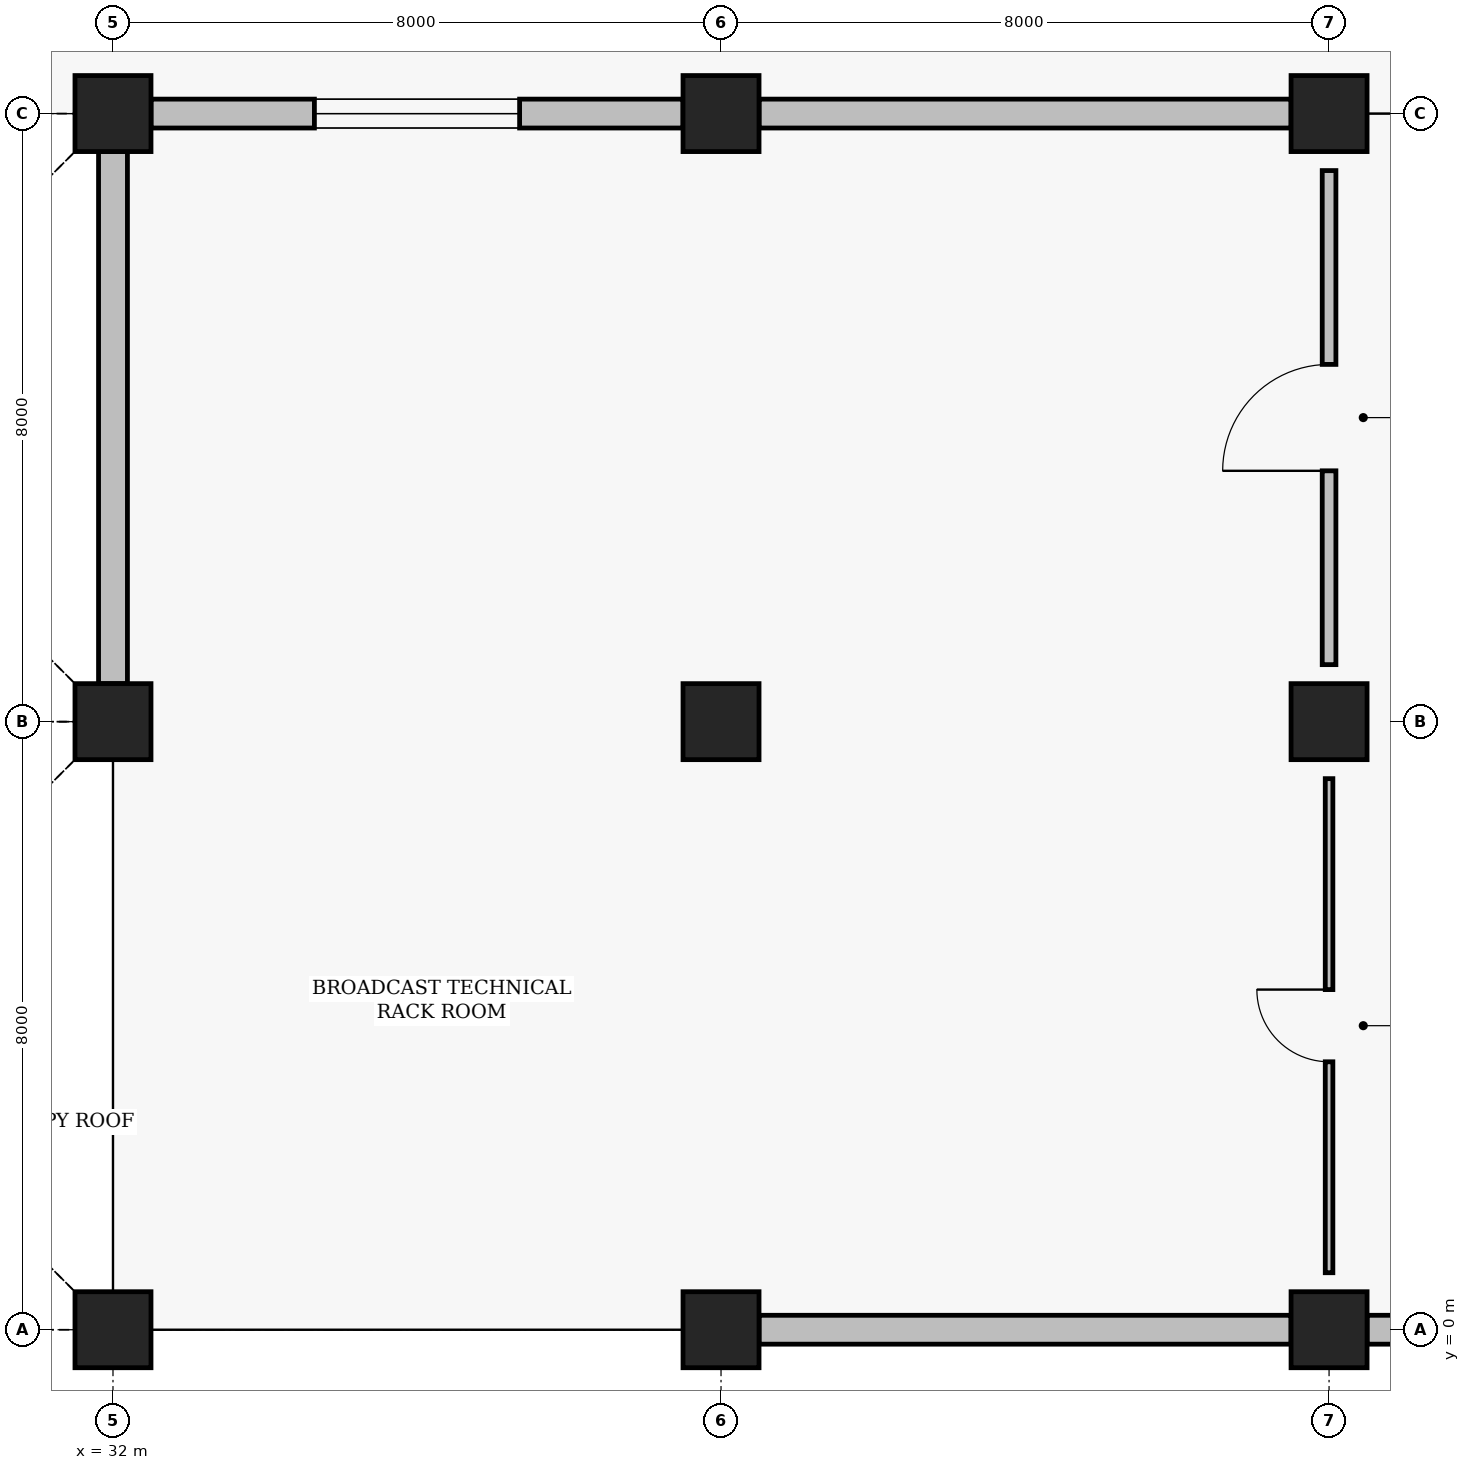
"""IFC4 building model, lengths in metres.
Left out: names, types, materials, properties, quantities, classifications, styles, units other than length and angle.
Written with IfcOpenShell. Run it as: python <this file> out.ifc"""

import sys

from ifc_helpers import new_model, si_unit, direction, frame, frame_2d, origin, origin_2d, place, context, subcontext, project, spatial, rectangle, extrude, element, fill, save


model = new_model("IFC4")
c1 = context("Model", 3, precision=1e-05, world=origin(), true_north=direction((0.0, 1.0)))
c2 = subcontext(c1, "Body", "Model", "MODEL_VIEW")
j1 = project(units=[si_unit("LENGTHUNIT", "METRE"), si_unit("PLANEANGLEUNIT", "RADIAN")], contexts=[c1])
p1 = place(None, origin())
s1 = spatial("IfcSite", under=j1, at=p1, CompositionType="ELEMENT")
p2 = place(p1, origin())
s2 = spatial("IfcBuilding", under=s1, at=p2, CompositionType="ELEMENT")
p3 = place(p2, frame((0.0, 0.0, 4.8)))
s3 = spatial("IfcBuildingStorey", under=s2, at=p3, CompositionType="ELEMENT", Elevation=4.8)
for number, where, z_axis, x_axis in (
    (1, (32.0, 0.0, 0.0), (0.0, 0.0, 1.0), (1.0, 0.0, 0.0)),
    (2, (32.0, 8.0, 0.0), (0.0, 0.0, 1.0), (1.0, 0.0, 0.0)),
    (3, (32.0, 16.0, 0.0), (0.0, 0.0, 1.0), (1.0, 0.0, 0.0)),
    (4, (40.0, 0.0, 0.0), (0.0, 0.0, 1.0), (1.0, 0.0, 0.0)),
    (5, (40.0, 8.0, 0.0), (0.0, 0.0, 1.0), (1.0, 0.0, 0.0)),
    (6, (40.0, 16.0, 0.0), (0.0, 0.0, 1.0), (1.0, 0.0, 0.0)),
    (7, (48.0, 0.0, 0.0), (0.0, 0.0, 1.0), (1.0, 0.0, 0.0)),
    (8, (48.0, 8.0, 0.0), (0.0, 0.0, 1.0), (1.0, 0.0, 0.0)),
    (9, (48.0, 16.0, 0.0), (0.0, 0.0, 1.0), (1.0, 0.0, 0.0)),
):
    element("IfcColumn", number, at=place(p3, frame(where, z_axis=z_axis, x_axis=x_axis)), inside=s3, PredefinedType="COLUMN", context=c2, shape_type="SweptSolid", body=[
        extrude(rectangle(XDim=1.0, YDim=1.0, at=origin_2d()), origin(), (0.0, 0.0, 1.0), 4.8),
    ])
p4 = place(p3, frame((32.5, 16.0, 0.0), z_axis=(0.0, 0.0, 1.0), x_axis=(1.0, 0.0, 0.0)))
e10 = element("IfcWall", 10, at=p4, inside=s3, PredefinedType="SOLIDWALL", context=c2, shape_type="SweptSolid", body=[
    extrude(rectangle(XDim=7.0, YDim=0.38, at=frame_2d((3.5, 0.0))), origin(), (0.0, 0.0, 1.0), 3.95),
])
p5 = place(p4, frame((2.15, 0.0, 0.95)))
e11 = element("IfcOpeningElement", 11, at=p5, cuts=e10, PredefinedType="OPENING", context=c2, shape_type="SweptSolid", body=[
    extrude(rectangle(XDim=2.7, YDim=2.1, at=frame_2d((1.35, 1.05))), frame((0.0, 0.2, 0.0), z_axis=(0.0, -1.0, 0.0), x_axis=(1.0, 0.0, 0.0)), (0.0, 0.0, 1.0), 0.4),
])
for number, where, z_axis, x_axis in (
    (12, (32.0, 8.5, 0.0), (0.0, 0.0, 1.0), (0.0, 1.0, 0.0)),
    (13, (40.5, 0.0, 0.0), (0.0, 0.0, 1.0), (1.0, 0.0, 0.0)),
    (14, (40.5, 16.0, 0.0), (0.0, 0.0, 1.0), (1.0, 0.0, 0.0)),
):
    element("IfcWall", number, at=place(p3, frame(where, z_axis=z_axis, x_axis=x_axis)), inside=s3, PredefinedType="SOLIDWALL", context=c2, shape_type="SweptSolid", body=[
        extrude(rectangle(XDim=7.0, YDim=0.38, at=frame_2d((3.5, 0.0))), origin(), (0.0, 0.0, 1.0), 3.95),
    ])
p6 = place(p3, frame((48.5, 0.0, 0.0), z_axis=(0.0, 0.0, 1.0), x_axis=(1.0, 0.0, 0.0)))
e15 = element("IfcWall", 15, at=p6, inside=s3, PredefinedType="SOLIDWALL", context=c2, shape_type="SweptSolid", body=[
    extrude(rectangle(XDim=7.0, YDim=0.38, at=frame_2d((3.5, 0.0))), origin(), (0.0, 0.0, 1.0), 3.95),
])
p7 = place(p6, frame((2.0, 0.0, 0.95)))
e16 = element("IfcOpeningElement", 16, at=p7, cuts=e15, PredefinedType="OPENING", context=c2, shape_type="SweptSolid", body=[
    extrude(rectangle(XDim=3.0, YDim=2.1, at=frame_2d((1.5, 1.05))), frame((0.0, 0.2, 0.0), z_axis=(0.0, -1.0, 0.0), x_axis=(1.0, 0.0, 0.0)), (0.0, 0.0, 1.0), 0.4),
])
p8 = place(p3, frame((48.0, 0.75, 0.0), z_axis=(0.0, 0.0, 1.0), x_axis=(0.0, 1.0, 0.0)))
e17 = element("IfcWall", 17, at=p8, inside=s3, PredefinedType="PARTITIONING", context=c2, shape_type="SweptSolid", body=[
    extrude(rectangle(XDim=6.5, YDim=0.1, at=frame_2d((3.25, 0.0))), origin(), (0.0, 0.0, 1.0), 3.97),
])
p9 = place(p8, frame((2.775, 0.0, 0.0)))
e18 = element("IfcOpeningElement", 18, at=p9, cuts=e17, PredefinedType="OPENING", context=c2, shape_type="SweptSolid", body=[
    extrude(rectangle(XDim=0.95, YDim=2.1, at=frame_2d((0.475, 1.05))), frame((0.0, 0.06, 0.0), z_axis=(0.0, -1.0, 0.0), x_axis=(1.0, 0.0, 0.0)), (0.0, 0.0, 1.0), 0.12),
])
p10 = place(p3, frame((48.0, 8.75, 0.0), z_axis=(0.0, 0.0, 1.0), x_axis=(0.0, 1.0, 0.0)))
e19 = element("IfcWall", 19, at=p10, inside=s3, PredefinedType="PARTITIONING", context=c2, shape_type="SweptSolid", body=[
    extrude(rectangle(XDim=6.5, YDim=0.18, at=frame_2d((3.25, 0.0))), origin(), (0.0, 0.0, 1.0), 3.97),
])
p11 = place(p10, frame((2.55, 0.0, 0.0)))
e20 = element("IfcOpeningElement", 20, at=p11, cuts=e19, PredefinedType="OPENING", context=c2, shape_type="SweptSolid", body=[
    extrude(rectangle(XDim=1.4, YDim=2.2, at=frame_2d((0.7, 1.1))), frame((0.0, 0.1, 0.0), z_axis=(0.0, -1.0, 0.0), x_axis=(1.0, 0.0, 0.0)), (0.0, 0.0, 1.0), 0.2),
])
p12 = place(p5, origin())
e21 = element("IfcWindow", 21, at=p12, inside=s3, PartitioningType="SINGLE_PANEL", PredefinedType="WINDOW", context=c2, shape_type="SweptSolid", body=[
    extrude(rectangle(XDim=2.7, YDim=2.1, at=frame_2d((1.35, 1.05))), frame((0.0, 0.03, 0.0), z_axis=(0.0, -1.0, 0.0), x_axis=(1.0, 0.0, 0.0)), (0.0, 0.0, 1.0), 0.06),
])
fill(e11, e21)
p13 = place(p9, origin())
e22 = element("IfcDoor", 22, at=p13, inside=s3, OperationType="SINGLE_SWING_RIGHT", PredefinedType="DOOR", context=c2, shape_type="SweptSolid", body=[
    extrude(rectangle(XDim=0.95, YDim=2.1, at=frame_2d((0.475, 1.05))), frame((0.0, 0.025, 0.0), z_axis=(0.0, -1.0, 0.0), x_axis=(1.0, 0.0, 0.0)), (0.0, 0.0, 1.0), 0.05),
])
fill(e18, e22)
p14 = place(p11, origin())
e23 = element("IfcDoor", 23, at=p14, inside=s3, OperationType="SINGLE_SWING_LEFT", PredefinedType="DOOR", context=c2, shape_type="SweptSolid", body=[
    extrude(rectangle(XDim=1.4, YDim=2.2, at=frame_2d((0.7, 1.1))), frame((0.0, 0.025, 0.0), z_axis=(0.0, -1.0, 0.0), x_axis=(1.0, 0.0, 0.0)), (0.0, 0.0, 1.0), 0.05),
])
fill(e20, e23)
save(model, sys.argv[1])
